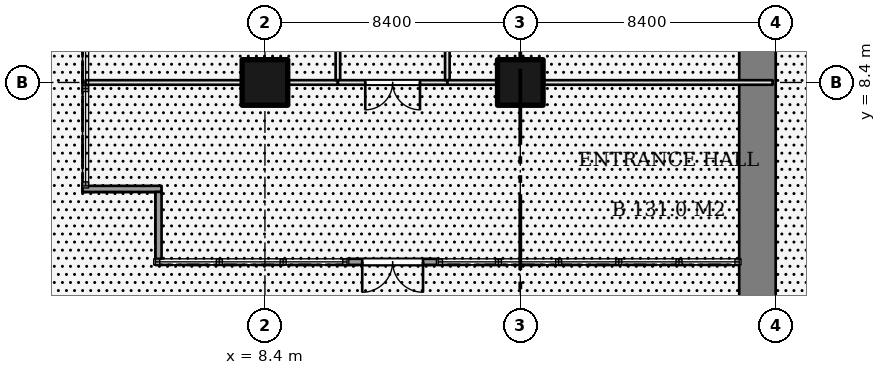
"""IFC4 building model, lengths in metres.
Left out: names, types, materials, properties, quantities, classifications, styles, units other than length and angle.
Written with IfcOpenShell. Run it as: python <this file> out.ifc"""

import sys

from ifc_helpers import new_model, si_unit, direction, frame, frame_2d, origin, origin_2d, place, context, subcontext, project, spatial, rectangle, extrude, element, fill, save


model = new_model("IFC4")
c1 = context("Model", 3, precision=1e-05, world=origin(), true_north=direction((0.0, 1.0)))
c2 = subcontext(c1, "Body", "Model", "MODEL_VIEW")
j1 = project(units=[si_unit("LENGTHUNIT", "METRE"), si_unit("PLANEANGLEUNIT", "RADIAN")], contexts=[c1])
p1 = place(None, origin())
s1 = spatial("IfcSite", under=j1, at=p1, CompositionType="ELEMENT")
p2 = place(p1, origin())
s2 = spatial("IfcBuilding", under=s1, at=p2, CompositionType="ELEMENT")
p3 = place(p2, origin())
s3 = spatial("IfcBuildingStorey", under=s2, at=p3, CompositionType="ELEMENT", Elevation=0.0)
for number, where, z_axis, x_axis in (
    (1, (8.4, 8.4, 0.0), (0.0, 0.0, 1.0), (1.0, 0.0, 0.0)),
    (2, (16.8, 8.4, 0.0), (0.0, 0.0, 1.0), (1.0, 0.0, 0.0)),
):
    element("IfcColumn", number, at=place(p3, frame(where, z_axis=z_axis, x_axis=x_axis)), inside=s3, PredefinedType="COLUMN", context=c2, shape_type="SweptSolid", body=[
        extrude(rectangle(XDim=1.5, YDim=1.5, at=origin_2d()), origin(), (0.0, 0.0, 1.0), 8.7),
    ])
p4 = place(p3, frame((24.6, 0.0, 0.0), z_axis=(0.0, 0.0, 1.0), x_axis=(0.0, 1.0, 0.0)))
e3 = element("IfcWall", 3, at=p4, inside=s3, PredefinedType="SHEAR", context=c2, shape_type="SweptSolid", body=[
    extrude(rectangle(XDim=25.2, YDim=1.2, at=frame_2d((12.6, 0.0))), origin(), (0.0, 0.0, 1.0), 8.7),
])
p5 = place(p4, frame((13.8, 0.0, 0.0)))
e4 = element("IfcOpeningElement", 4, at=p5, cuts=e3, PredefinedType="OPENING", context=c2, shape_type="SweptSolid", body=[
    extrude(rectangle(XDim=1.2, YDim=2.1, at=frame_2d((0.6, 1.05))), frame((0.0, 0.61, 0.0), z_axis=(0.0, -1.0, 0.0), x_axis=(1.0, 0.0, 0.0)), (0.0, 0.0, 1.0), 1.22),
])
p6 = place(p4, frame((12.1, 0.0, 0.0)))
e5 = element("IfcOpeningElement", 5, at=p6, cuts=e3, PredefinedType="OPENING", context=c2, shape_type="SweptSolid", body=[
    extrude(rectangle(XDim=1.0, YDim=2.4, at=frame_2d((0.5, 1.2))), frame((0.0, 0.61, 0.0), z_axis=(0.0, -1.0, 0.0), x_axis=(1.0, 0.0, 0.0)), (0.0, 0.0, 1.0), 1.22),
])
p7 = place(p4, frame((20.5, 0.0, 0.0)))
e6 = element("IfcOpeningElement", 6, at=p7, cuts=e3, PredefinedType="OPENING", context=c2, shape_type="SweptSolid", body=[
    extrude(rectangle(XDim=1.0, YDim=2.4, at=frame_2d((0.5, 1.2))), frame((0.0, 0.61, 0.0), z_axis=(0.0, -1.0, 0.0), x_axis=(1.0, 0.0, 0.0)), (0.0, 0.0, 1.0), 1.22),
])
p8 = place(p3, frame((2.5, 8.4, 0.0), z_axis=(0.0, 0.0, 1.0), x_axis=(1.0, 0.0, 0.0)))
e7 = element("IfcWall", 7, at=p8, inside=s3, PredefinedType="PARTITIONING", context=c2, shape_type="SweptSolid", body=[
    extrude(rectangle(XDim=5.15, YDim=0.15, at=frame_2d((2.575, 0.0))), origin(), (0.0, 0.0, 1.0), 8.7),
])
p9 = place(p3, frame((9.15, 8.4, 0.0), z_axis=(0.0, 0.0, 1.0), x_axis=(1.0, 0.0, 0.0)))
e8 = element("IfcWall", 8, at=p9, inside=s3, PredefinedType="PARTITIONING", context=c2, shape_type="SweptSolid", body=[
    extrude(rectangle(XDim=1.65, YDim=0.15, at=frame_2d((0.825, 0.0))), origin(), (0.0, 0.0, 1.0), 8.7),
])
p10 = place(p3, frame((10.8, 8.475, 0.0), z_axis=(0.0, 0.0, 1.0), x_axis=(0.0, 1.0, 0.0)))
e9 = element("IfcWall", 9, at=p10, inside=s3, PredefinedType="PARTITIONING", context=c2, shape_type="SweptSolid", body=[
    extrude(rectangle(XDim=8.25, YDim=0.15, at=frame_2d((4.125, 0.0))), origin(), (0.0, 0.0, 1.0), 8.7),
])
p11 = place(p10, frame((3.625, 0.0, 0.0)))
e10 = element("IfcOpeningElement", 10, at=p11, cuts=e9, PredefinedType="OPENING", context=c2, shape_type="SweptSolid", body=[
    extrude(rectangle(XDim=1.0, YDim=2.1, at=frame_2d((0.5, 1.05))), frame((0.0, 0.085, 0.0), z_axis=(0.0, -1.0, 0.0), x_axis=(1.0, 0.0, 0.0)), (0.0, 0.0, 1.0), 0.17),
])
p12 = place(p3, frame((10.8, 8.4, 0.0), z_axis=(0.0, 0.0, 1.0), x_axis=(1.0, 0.0, 0.0)))
e11 = element("IfcWall", 11, at=p12, inside=s3, PredefinedType="PARTITIONING", context=c2, shape_type="SweptSolid", body=[
    extrude(rectangle(XDim=3.6, YDim=0.15, at=frame_2d((1.8, 0.0))), origin(), (0.0, 0.0, 1.0), 8.7),
])
p13 = place(p12, frame((0.9, 0.0, 0.0)))
e12 = element("IfcOpeningElement", 12, at=p13, cuts=e11, PredefinedType="OPENING", context=c2, shape_type="SweptSolid", body=[
    extrude(rectangle(XDim=1.8, YDim=2.1, at=frame_2d((0.9, 1.05))), frame((0.0, 0.085, 0.0), z_axis=(0.0, -1.0, 0.0), x_axis=(1.0, 0.0, 0.0)), (0.0, 0.0, 1.0), 0.17),
])
p14 = place(p3, frame((14.4, 8.475, 0.0), z_axis=(0.0, 0.0, 1.0), x_axis=(0.0, 1.0, 0.0)))
e13 = element("IfcWall", 13, at=p14, inside=s3, PredefinedType="PARTITIONING", context=c2, shape_type="SweptSolid", body=[
    extrude(rectangle(XDim=5.125, YDim=0.15, at=frame_2d((2.562, 0.0))), origin(), (0.0, 0.0, 1.0), 8.7),
])
p15 = place(p14, frame((2.062, 0.0, 0.0)))
e14 = element("IfcOpeningElement", 14, at=p15, cuts=e13, PredefinedType="OPENING", context=c2, shape_type="SweptSolid", body=[
    extrude(rectangle(XDim=1.0, YDim=2.1, at=frame_2d((0.5, 1.05))), frame((0.0, 0.085, 0.0), z_axis=(0.0, -1.0, 0.0), x_axis=(1.0, 0.0, 0.0)), (0.0, 0.0, 1.0), 0.17),
])
p16 = place(p3, frame((14.4, 8.4, 0.0), z_axis=(0.0, 0.0, 1.0), x_axis=(1.0, 0.0, 0.0)))
e15 = element("IfcWall", 15, at=p16, inside=s3, PredefinedType="PARTITIONING", context=c2, shape_type="SweptSolid", body=[
    extrude(rectangle(XDim=1.65, YDim=0.15, at=frame_2d((0.825, 0.0))), origin(), (0.0, 0.0, 1.0), 8.7),
])
p17 = place(p3, frame((17.55, 8.4, 0.0), z_axis=(0.0, 0.0, 1.0), x_axis=(1.0, 0.0, 0.0)))
e16 = element("IfcWall", 16, at=p17, inside=s3, PredefinedType="PARTITIONING", context=c2, shape_type="SweptSolid", body=[
    extrude(rectangle(XDim=7.55, YDim=0.15, at=frame_2d((3.775, 0.0))), origin(), (0.0, 0.0, 1.0), 8.7),
])
p18 = place(p3, frame((2.4, 4.9, 0.0), z_axis=(0.0, 0.0, 1.0), x_axis=(1.0, 0.0, 0.0)))
e17 = element("IfcWall", 17, at=p18, inside=s3, PredefinedType="SOLIDWALL", context=c2, shape_type="SweptSolid", body=[
    extrude(rectangle(XDim=2.6, YDim=0.2, at=frame_2d((1.3, 0.0))), origin(), (0.0, 0.0, 1.0), 8.7),
])
p19 = place(p3, frame((4.9, 4.8, 0.0), z_axis=(0.0, 0.0, 1.0), x_axis=(0.0, -1.0, 0.0)))
e18 = element("IfcWall", 18, at=p19, inside=s3, PredefinedType="SOLIDWALL", context=c2, shape_type="SweptSolid", body=[
    extrude(rectangle(XDim=2.2, YDim=0.2, at=frame_2d((1.1, 0.0))), origin(), (0.0, 0.0, 1.0), 8.7),
])
p20 = place(p3, frame((11.1, 2.5, 0.0), z_axis=(0.0, 0.0, 1.0), x_axis=(1.0, 0.0, 0.0)))
e19 = element("IfcWall", 19, at=p20, inside=s3, PredefinedType="SOLIDWALL", context=c2, shape_type="SweptSolid", body=[
    extrude(rectangle(XDim=3.0, YDim=0.2, at=frame_2d((1.5, 0.0))), origin(), (0.0, 0.0, 1.0), 8.7),
])
p21 = place(p20, frame((0.5, 0.0, 0.0)))
e20 = element("IfcOpeningElement", 20, at=p21, cuts=e19, PredefinedType="OPENING", context=c2, shape_type="SweptSolid", body=[
    extrude(rectangle(XDim=2.0, YDim=2.4, at=frame_2d((1.0, 1.2))), frame((0.0, 0.11, 0.0), z_axis=(0.0, -1.0, 0.0), x_axis=(1.0, 0.0, 0.0)), (0.0, 0.0, 1.0), 0.22),
])
p22 = place(p13, frame((1.8, 0.0, 0.0), z_axis=(0.0, 0.0, 1.0), x_axis=(-1.0, 0.0, 0.0)))
e21 = element("IfcDoor", 21, at=p22, inside=s3, OperationType="DOUBLE_DOOR_SINGLE_SWING", PredefinedType="DOOR", context=c2, shape_type="SweptSolid", body=[
    extrude(rectangle(XDim=1.8, YDim=2.1, at=frame_2d((0.9, 1.05))), frame((0.0, 0.025, 0.0), z_axis=(0.0, -1.0, 0.0), x_axis=(1.0, 0.0, 0.0)), (0.0, 0.0, 1.0), 0.05),
])
fill(e12, e21)
p23 = place(p21, frame((2.0, 0.0, 0.0), z_axis=(0.0, 0.0, 1.0), x_axis=(-1.0, 0.0, 0.0)))
e22 = element("IfcDoor", 22, at=p23, inside=s3, OperationType="DOUBLE_DOOR_SINGLE_SWING", PredefinedType="DOOR", context=c2, shape_type="SweptSolid", body=[
    extrude(rectangle(XDim=2.0, YDim=2.4, at=frame_2d((1.0, 1.2))), frame((0.0, 0.025, 0.0), z_axis=(0.0, -1.0, 0.0), x_axis=(1.0, 0.0, 0.0)), (0.0, 0.0, 1.0), 0.05),
])
fill(e20, e22)
save(model, sys.argv[1])
